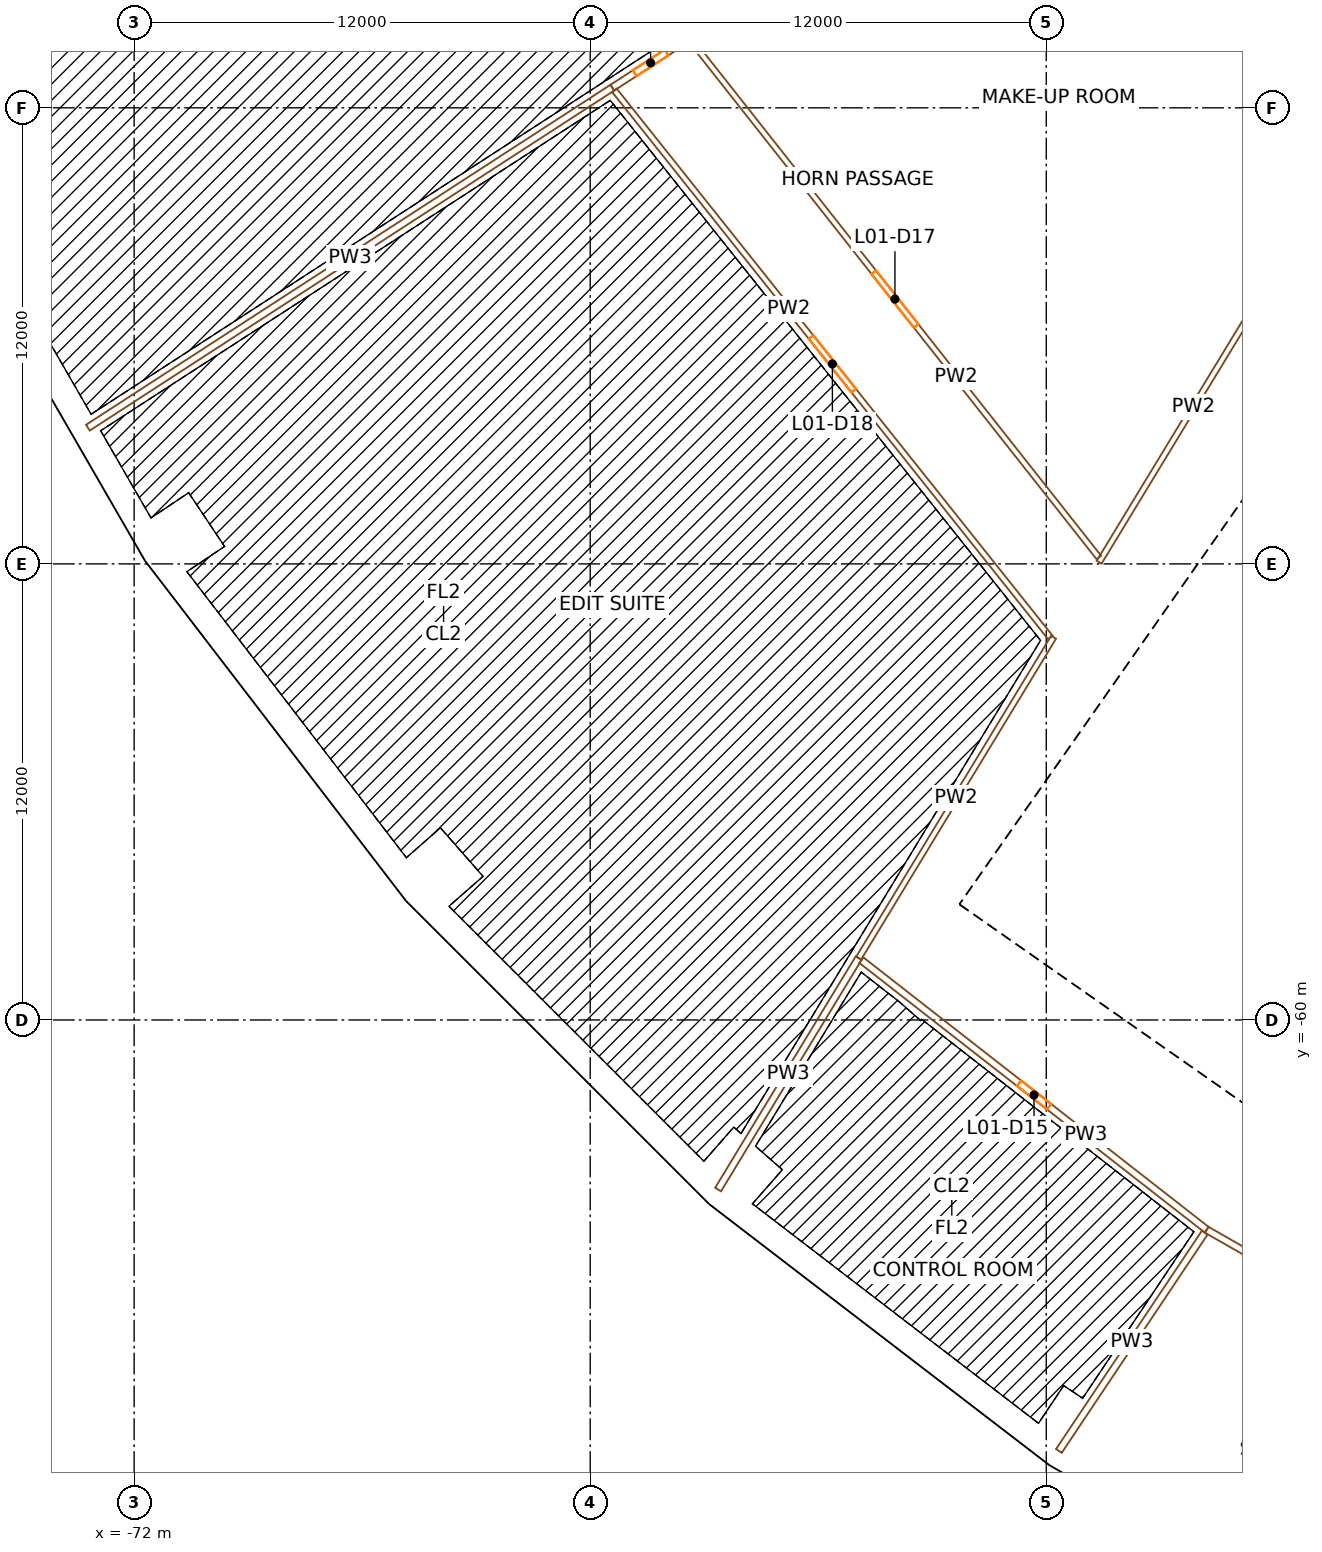
"""IFC4 building model, lengths in metres.
Left out: names, types, materials, properties, quantities, classifications, styles, units other than length and angle.
Written with IfcOpenShell. Run it as: python <this file> out.ifc"""

import sys

from ifc_helpers import new_model, si_unit, direction, frame, frame_2d, origin, origin_2d, place, context, subcontext, project, spatial, rectangle, extrude, element, fill, save


model = new_model("IFC4")
c1 = context("Model", 3, precision=1e-05, world=origin(), true_north=direction((0.0, 1.0)))
c2 = subcontext(c1, "Body", "Model", "MODEL_VIEW")
j1 = project(units=[si_unit("LENGTHUNIT", "METRE"), si_unit("PLANEANGLEUNIT", "RADIAN")], contexts=[c1])
p1 = place(None, origin())
s1 = spatial("IfcSite", under=j1, at=p1, CompositionType="ELEMENT")
p2 = place(p1, origin())
s2 = spatial("IfcBuilding", under=s1, at=p2, CompositionType="ELEMENT")
p3 = place(p2, frame((0.0, 0.0, 9.0)))
s3 = spatial("IfcBuildingStorey", under=s2, at=p3, CompositionType="ELEMENT", Elevation=9.0)
for number, where, z_axis, x_axis in (
    (1, (-69.732, -34.388, 0.0), (0.0, 0.0, 1.0), (0.442, -0.897, 0.0)),
    (2, (-64.647, -43.196, 0.0), (0.0, 0.0, 1.0), (0.556, -0.831, 0.0)),
):
    element("IfcColumn", number, at=place(p3, frame(where, z_axis=z_axis, x_axis=x_axis)), inside=s3, PredefinedType="COLUMN", context=c2, shape_type="SweptSolid", body=[
        extrude(rectangle(XDim=1.4, YDim=1.8, at=origin_2d()), origin(), (0.0, 0.0, 1.0), 9.0),
    ])
p4 = place(p3, frame((-70.883, -47.362, 0.0), z_axis=(0.0, 0.0, 1.0), x_axis=(0.55557023302, -0.831469612303, 0.0)))
e3 = element("IfcColumn", 3, at=p4, inside=s3, PredefinedType="COLUMN", context=c2, shape_type="SweptSolid", body=[
    extrude(rectangle(XDim=1.1, YDim=1.3, at=origin_2d()), origin(), (0.0, 0.0, 1.0), 9.0),
])
for number, where, z_axis, x_axis in (
    (4, (-43.795, -38.407, 0.0), (0.0, 0.0, 1.0), (0.659, -0.752, 0.0)),
    (5, (-58.456, -51.264, 0.0), (0.0, 0.0, 1.0), (0.659, -0.752, 0.0)),
):
    element("IfcColumn", number, at=place(p3, frame(where, z_axis=z_axis, x_axis=x_axis)), inside=s3, PredefinedType="COLUMN", context=c2, shape_type="SweptSolid", body=[
        extrude(rectangle(XDim=1.4, YDim=1.8, at=origin_2d()), origin(), (0.0, 0.0, 1.0), 9.0),
    ])
p5 = place(p3, frame((-64.094, -56.209, 0.0), z_axis=(0.0, 0.0, 1.0), x_axis=(0.6593458151, -0.751839807479, 0.0)))
e6 = element("IfcColumn", 6, at=p5, inside=s3, PredefinedType="COLUMN", context=c2, shape_type="SweptSolid", body=[
    extrude(rectangle(XDim=1.1, YDim=1.3, at=origin_2d()), origin(), (0.0, 0.0, 1.0), 9.0),
])
p6 = place(p3, frame((-51.264, -58.456, 0.0), z_axis=(0.0, 0.0, 1.0), x_axis=(0.751839807479, -0.6593458151, 0.0)))
e7 = element("IfcColumn", 7, at=p6, inside=s3, PredefinedType="COLUMN", context=c2, shape_type="SweptSolid", body=[
    extrude(rectangle(XDim=1.4, YDim=1.8, at=origin_2d()), origin(), (0.0, 0.0, 1.0), 9.0),
])
p7 = place(p3, frame((-56.209, -64.094, 0.0), z_axis=(0.0, 0.0, 1.0), x_axis=(0.751839807479, -0.6593458151, 0.0)))
e8 = element("IfcColumn", 8, at=p7, inside=s3, PredefinedType="COLUMN", context=c2, shape_type="SweptSolid", body=[
    extrude(rectangle(XDim=1.1, YDim=1.3, at=origin_2d()), origin(), (0.0, 0.0, 1.0), 9.0),
])
p8 = place(p3, frame((-43.196, -64.647, 0.0), z_axis=(0.0, 0.0, 1.0), x_axis=(0.831469612303, -0.55557023302, 0.0)))
e9 = element("IfcColumn", 9, at=p8, inside=s3, PredefinedType="COLUMN", context=c2, shape_type="SweptSolid", body=[
    extrude(rectangle(XDim=1.4, YDim=1.8, at=origin_2d()), origin(), (0.0, 0.0, 1.0), 9.0),
])
p9 = place(p3, frame((-47.362, -70.883, 0.0), z_axis=(0.0, 0.0, 1.0), x_axis=(0.831469612303, -0.55557023302, 0.0)))
e10 = element("IfcColumn", 10, at=p9, inside=s3, PredefinedType="COLUMN", context=c2, shape_type="SweptSolid", body=[
    extrude(rectangle(XDim=1.1, YDim=1.3, at=origin_2d()), origin(), (0.0, 0.0, 1.0), 9.0),
])
p10 = place(p3, frame((-49.779, -57.191, 0.0), z_axis=(0.0, 0.0, 1.0), x_axis=(0.573577477574, 0.819151315216, 0.0)))
e11 = element("IfcWall", 11, at=p10, inside=s3, PredefinedType="SHEAR", context=c2, shape_type="SweptSolid", body=[
    extrude(rectangle(XDim=14.8, YDim=0.9, at=frame_2d((7.4, 0.0))), origin(), (0.0, 0.0, 1.0), 8.6),
])
p11 = place(p10, frame((6.7, 0.0, 0.0)))
e12 = element("IfcOpeningElement", 12, at=p11, cuts=e11, PredefinedType="OPENING", context=c2, shape_type="SweptSolid", body=[
    extrude(rectangle(XDim=1.4, YDim=2.1, at=frame_2d((0.7, 1.05))), frame((0.0, 0.46, 0.0), z_axis=(0.0, -1.0, 0.0), x_axis=(1.0, 0.0, 0.0)), (0.0, 0.0, 1.0), 0.92),
])
p12 = place(p3, frame((-36.827, -65.71, 0.0), z_axis=(0.0, 0.0, 1.0), x_axis=(-0.819153391756, 0.573574511963, 0.0)))
e13 = element("IfcWall", 13, at=p12, inside=s3, PredefinedType="SHEAR", context=c2, shape_type="SweptSolid", body=[
    extrude(rectangle(XDim=15.045, YDim=0.9, at=frame_2d((7.523, 0.0))), origin(), (0.0, 0.0, 1.0), 8.6),
])
p13 = place(p12, frame((0.8, 0.0, 0.0)))
e14 = element("IfcOpeningElement", 14, at=p13, cuts=e13, PredefinedType="OPENING", context=c2, shape_type="SweptSolid", body=[
    extrude(rectangle(XDim=1.0, YDim=2.1, at=frame_2d((0.5, 1.05))), frame((0.0, 0.46, 0.0), z_axis=(0.0, -1.0, 0.0), x_axis=(1.0, 0.0, 0.0)), (0.0, 0.0, 1.0), 0.92),
])
p14 = place(p12, frame((3.475, 0.0, 0.0)))
e15 = element("IfcOpeningElement", 15, at=p14, cuts=e13, PredefinedType="OPENING", context=c2, shape_type="SweptSolid", body=[
    extrude(rectangle(XDim=1.0, YDim=2.1, at=frame_2d((0.5, 1.05))), frame((0.0, 0.46, 0.0), z_axis=(0.0, -1.0, 0.0), x_axis=(1.0, 0.0, 0.0)), (0.0, 0.0, 1.0), 0.92),
])
p15 = place(p12, frame((6.175, 0.0, 0.0)))
e16 = element("IfcOpeningElement", 16, at=p15, cuts=e13, PredefinedType="OPENING", context=c2, shape_type="SweptSolid", body=[
    extrude(rectangle(XDim=1.0, YDim=2.1, at=frame_2d((0.5, 1.05))), frame((0.0, 0.46, 0.0), z_axis=(0.0, -1.0, 0.0), x_axis=(1.0, 0.0, 0.0)), (0.0, 0.0, 1.0), 0.92),
])
p16 = place(p12, frame((13.495, 0.0, 0.0)))
e17 = element("IfcOpeningElement", 17, at=p16, cuts=e13, PredefinedType="OPENING", context=c2, shape_type="SweptSolid", body=[
    extrude(rectangle(XDim=1.1, YDim=2.1, at=frame_2d((0.55, 1.05))), frame((0.0, 0.46, 0.0), z_axis=(0.0, -1.0, 0.0), x_axis=(1.0, 0.0, 0.0)), (0.0, 0.0, 1.0), 0.92),
])
p17 = place(p3, frame((-43.204, -60.696, 0.0), z_axis=(0.0, 0.0, 1.0), x_axis=(0.573571992966, 0.819155155563, 0.0)))
e18 = element("IfcWall", 18, at=p17, inside=s3, PredefinedType="SOLIDWALL", context=c2, shape_type="SweptSolid", body=[
    extrude(rectangle(XDim=13.0, YDim=0.3, at=frame_2d((6.5, 0.0))), origin(), (0.0, 0.0, 1.0), 8.6),
])
p18 = place(p3, frame((-37.936, -52.91, 0.0), z_axis=(0.0, 0.0, 1.0), x_axis=(-0.819147518138, 0.57358290031, 0.0)))
e19 = element("IfcWall", 19, at=p18, inside=s3, PredefinedType="SOLIDWALL", context=c2, shape_type="SweptSolid", body=[
    extrude(rectangle(XDim=6.795, YDim=0.3, at=frame_2d((3.398, 0.0))), origin(), (0.0, 0.0, 1.0), 8.6),
])
p19 = place(p18, frame((5.32, 0.0, 0.0)))
e20 = element("IfcOpeningElement", 20, at=p19, cuts=e19, PredefinedType="OPENING", context=c2, shape_type="SweptSolid", body=[
    extrude(rectangle(XDim=1.1, YDim=2.1, at=frame_2d((0.55, 1.05))), frame((0.0, 0.16, 0.0), z_axis=(0.0, -1.0, 0.0), x_axis=(1.0, 0.0, 0.0)), (0.0, 0.0, 1.0), 0.32),
])
p20 = place(p3, frame((-41.262, -57.661, 0.0), z_axis=(0.0, 0.0, 1.0), x_axis=(-0.819164398642, 0.573558792102, 0.0)))
e21 = element("IfcWall", 21, at=p20, inside=s3, PredefinedType="SOLIDWALL", context=c2, shape_type="SweptSolid", body=[
    extrude(rectangle(XDim=6.795, YDim=0.3, at=frame_2d((3.397, 0.0))), origin(), (0.0, 0.0, 1.0), 8.6),
])
p21 = place(p20, frame((5.32, 0.0, 0.0)))
e22 = element("IfcOpeningElement", 22, at=p21, cuts=e21, PredefinedType="OPENING", context=c2, shape_type="SweptSolid", body=[
    extrude(rectangle(XDim=1.1, YDim=2.1, at=frame_2d((0.55, 1.05))), frame((0.0, 0.16, 0.0), z_axis=(0.0, -1.0, 0.0), x_axis=(1.0, 0.0, 0.0)), (0.0, 0.0, 1.0), 0.32),
])
p22 = place(p3, frame((-43.757, -55.731, 0.0), z_axis=(0.0, 0.0, 1.0), x_axis=(0.573536818435, 0.819179783625, 0.0)))
e23 = element("IfcWall", 23, at=p22, inside=s3, PredefinedType="SOLIDWALL", context=c2, shape_type="SweptSolid", body=[
    extrude(rectangle(XDim=5.5, YDim=0.3, at=frame_2d((2.75, 0.0))), origin(), (0.0, 0.0, 1.0), 8.6),
])
p23 = place(p22, frame((0.7, 0.0, 0.0)))
e24 = element("IfcOpeningElement", 24, at=p23, cuts=e23, PredefinedType="OPENING", context=c2, shape_type="SweptSolid", body=[
    extrude(rectangle(XDim=1.1, YDim=2.1, at=frame_2d((0.55, 1.05))), frame((0.0, 0.16, 0.0), z_axis=(0.0, -1.0, 0.0), x_axis=(1.0, 0.0, 0.0)), (0.0, 0.0, 1.0), 0.32),
])
p24 = place(p22, frame((3.7, 0.0, 0.0)))
e25 = element("IfcOpeningElement", 25, at=p24, cuts=e23, PredefinedType="OPENING", context=c2, shape_type="SweptSolid", body=[
    extrude(rectangle(XDim=1.1, YDim=2.1, at=frame_2d((0.55, 1.05))), frame((0.0, 0.16, 0.0), z_axis=(0.0, -1.0, 0.0), x_axis=(1.0, 0.0, 0.0)), (0.0, 0.0, 1.0), 0.32),
])
p25 = place(p3, frame((-47.065, -56.192, 0.0), z_axis=(0.0, 0.0, 1.0), x_axis=(0.573822822947, 0.818979467304, 0.0)))
e26 = element("IfcWall", 26, at=p25, inside=s3, PredefinedType="SOLIDWALL", context=c2, shape_type="SweptSolid", body=[
    extrude(rectangle(XDim=0.5, YDim=0.3, at=frame_2d((0.25, 0.0))), origin(), (0.0, 0.0, 1.0), 4.3),
])
p26 = place(p3, frame((-77.168, -38.022, 0.0), z_axis=(0.0, 0.0, 1.0), x_axis=(0.500001430823, -0.866024577697, 0.0)))
e27 = element("IfcWall", 27, at=p26, inside=s3, PredefinedType="SOLIDWALL", context=c2, shape_type="SweptSolid", body=[
    extrude(rectangle(XDim=11.312, YDim=0.45, at=frame_2d((5.656, 0.0))), origin(), (0.0, 0.0, 1.0), 7.7),
])
p27 = place(p3, frame((-71.491, -47.839, 0.0), z_axis=(0.0, 0.0, 1.0), x_axis=(0.608758773695, -0.793355377778, 0.0)))
e28 = element("IfcWall", 28, at=p27, inside=s3, PredefinedType="SOLIDWALL", context=c2, shape_type="SweptSolid", body=[
    extrude(rectangle(XDim=11.135, YDim=0.45, at=frame_2d((5.567, 0.0))), origin(), (0.0, 0.0, 1.0), 7.7),
])
p28 = place(p3, frame((-64.698, -56.699, 0.0), z_axis=(0.0, 0.0, 1.0), x_axis=(0.707106781187, -0.707106781187, 0.0)))
e29 = element("IfcWall", 29, at=p28, inside=s3, PredefinedType="SOLIDWALL", context=c2, shape_type="SweptSolid", body=[
    extrude(rectangle(XDim=11.312, YDim=0.45, at=frame_2d((5.656, 0.0))), origin(), (0.0, 0.0, 1.0), 7.7),
])
p29 = place(p3, frame((-56.673, -64.713, 0.0), z_axis=(0.0, 0.0, 1.0), x_axis=(0.793355377778, -0.608758773695, 0.0)))
e30 = element("IfcWall", 30, at=p29, inside=s3, PredefinedType="SOLIDWALL", context=c2, shape_type="SweptSolid", body=[
    extrude(rectangle(XDim=11.135, YDim=0.45, at=frame_2d((5.567, 0.0))), origin(), (0.0, 0.0, 1.0), 7.7),
])
p30 = place(p3, frame((-47.819, -71.512, 0.0), z_axis=(0.0, 0.0, 1.0), x_axis=(0.866024577697, -0.500001430823, 0.0)))
e31 = element("IfcWall", 31, at=p30, inside=s3, PredefinedType="SOLIDWALL", context=c2, shape_type="SweptSolid", body=[
    extrude(rectangle(XDim=11.312, YDim=0.45, at=frame_2d((5.656, 0.0))), origin(), (0.0, 0.0, 1.0), 7.7),
])
p31 = place(p3, frame((-73.217, -44.416, 0.0), z_axis=(0.0, 0.0, 1.0), x_axis=(0.839098650594, 0.543979277703, 0.0)))
e32 = element("IfcWall", 32, at=p31, inside=s3, PredefinedType="PARTITIONING", context=c2, shape_type="SweptSolid", body=[
    extrude(rectangle(XDim=16.445, YDim=0.18, at=frame_2d((8.223, 0.0))), origin(), (0.0, 0.0, 1.0), 7.6),
])
p32 = place(p3, frame((-59.418, -35.47, 0.0), z_axis=(0.0, 0.0, 1.0), x_axis=(0.839081673018, 0.544005465051, 0.0)))
e33 = element("IfcWall", 33, at=p32, inside=s3, PredefinedType="PARTITIONING", context=c2, shape_type="SweptSolid", body=[
    extrude(rectangle(XDim=2.402, YDim=0.18, at=frame_2d((1.201, 0.0))), origin(), (0.0, 0.0, 1.0), 7.6),
])
p33 = place(p32, frame((0.701, 0.0, 0.0)))
e34 = element("IfcOpeningElement", 34, at=p33, cuts=e33, PredefinedType="OPENING", context=c2, shape_type="SweptSolid", body=[
    extrude(rectangle(XDim=1.0, YDim=2.1, at=frame_2d((0.5, 1.05))), frame((0.0, 0.1, 0.0), z_axis=(0.0, -1.0, 0.0), x_axis=(1.0, 0.0, 0.0)), (0.0, 0.0, 1.0), 0.2),
])
p34 = place(p3, frame((-52.936, -58.372, 0.0), z_axis=(0.0, 0.0, 1.0), x_axis=(-0.519148894699, -0.854683815883, 0.0)))
e35 = element("IfcWall", 35, at=p34, inside=s3, PredefinedType="PARTITIONING", context=c2, shape_type="SweptSolid", body=[
    extrude(rectangle(XDim=7.125, YDim=0.18, at=frame_2d((3.563, 0.0))), origin(), (0.0, 0.0, 1.0), 7.6),
])
p35 = place(p3, frame((-43.779, -65.52, 0.0), z_axis=(0.0, 0.0, 1.0), x_axis=(-0.788252635542, 0.615351755146, 0.0)))
e36 = element("IfcWall", 36, at=p35, inside=s3, PredefinedType="PARTITIONING", context=c2, shape_type="SweptSolid", body=[
    extrude(rectangle(XDim=11.526, YDim=0.18, at=frame_2d((5.763, 0.0))), origin(), (0.0, 0.0, 1.0), 7.6),
])
p36 = place(p35, frame((5.263, 0.0, 0.0)))
e37 = element("IfcOpeningElement", 37, at=p36, cuts=e36, PredefinedType="OPENING", context=c2, shape_type="SweptSolid", body=[
    extrude(rectangle(XDim=1.0, YDim=2.1, at=frame_2d((0.5, 1.05))), frame((0.0, 0.1, 0.0), z_axis=(0.0, -1.0, 0.0), x_axis=(1.0, 0.0, 0.0)), (0.0, 0.0, 1.0), 0.2),
])
p37 = place(p3, frame((-47.668, -71.34, 0.0), z_axis=(0.0, 0.0, 1.0), x_axis=(0.555588604147, 0.831457336814, 0.0)))
e38 = element("IfcWall", 38, at=p37, inside=s3, PredefinedType="PARTITIONING", context=c2, shape_type="SweptSolid", body=[
    extrude(rectangle(XDim=6.91, YDim=0.18, at=frame_2d((3.455, 0.0))), origin(), (0.0, 0.0, 1.0), 7.6),
])
p38 = place(p3, frame((-47.893, -49.935, 0.0), z_axis=(0.0, 0.0, 1.0), x_axis=(-0.623145641882, 0.782105817011, 0.0)))
e39 = element("IfcWall", 39, at=p38, inside=s3, PredefinedType="PARTITIONING", context=c2, shape_type="SweptSolid", body=[
    extrude(rectangle(XDim=18.404, YDim=0.15, at=frame_2d((9.202, 0.0))), origin(), (0.0, 0.0, 1.0), 7.6),
])
p39 = place(p38, frame((8.302, 0.0, 0.0)))
e40 = element("IfcOpeningElement", 40, at=p39, cuts=e39, PredefinedType="OPENING", context=c2, shape_type="SweptSolid", body=[
    extrude(rectangle(XDim=1.8, YDim=2.1, at=frame_2d((0.9, 1.05))), frame((0.0, 0.085, 0.0), z_axis=(0.0, -1.0, 0.0), x_axis=(1.0, 0.0, 0.0)), (0.0, 0.0, 1.0), 0.17),
])
p40 = place(p3, frame((-47.808, -49.929, 0.0), z_axis=(0.0, 0.0, 1.0), x_axis=(-0.519169679695, -0.854671190392, 0.0)))
e41 = element("IfcWall", 41, at=p40, inside=s3, PredefinedType="PARTITIONING", context=c2, shape_type="SweptSolid", body=[
    extrude(rectangle(XDim=9.878, YDim=0.15, at=frame_2d((4.939, 0.0))), origin(), (0.0, 0.0, 1.0), 7.6),
])
p41 = place(p3, frame((-57.347, -34.235, 0.0), z_axis=(0.0, 0.0, 1.0), x_axis=(0.619516324984, -0.784983772494, 0.0)))
e42 = element("IfcWall", 42, at=p41, inside=s3, PredefinedType="PARTITIONING", context=c2, shape_type="SweptSolid", body=[
    extrude(rectangle(XDim=17.322, YDim=0.15, at=frame_2d((8.661, 0.0))), origin(), (0.0, 0.0, 1.0), 7.6),
])
p42 = place(p41, frame((7.761, 0.0, 0.0)))
e43 = element("IfcOpeningElement", 43, at=p42, cuts=e42, PredefinedType="OPENING", context=c2, shape_type="SweptSolid", body=[
    extrude(rectangle(XDim=1.8, YDim=2.1, at=frame_2d((0.9, 1.05))), frame((0.0, 0.085, 0.0), z_axis=(0.0, -1.0, 0.0), x_axis=(1.0, 0.0, 0.0)), (0.0, 0.0, 1.0), 0.17),
])
p43 = place(p3, frame((-34.338, -70.918, 0.0), z_axis=(0.0, 0.0, 1.0), x_axis=(-0.868109106225, 0.496373427663, 0.0)))
e44 = element("IfcWall", 44, at=p43, inside=s3, PredefinedType="PARTITIONING", context=c2, shape_type="SweptSolid", body=[
    extrude(rectangle(XDim=10.875, YDim=0.18, at=frame_2d((5.438, 0.0))), origin(), (0.0, 0.0, 1.0), 7.6),
])
p44 = place(p43, frame((4.938, 0.0, 0.0)))
e45 = element("IfcOpeningElement", 45, at=p44, cuts=e44, PredefinedType="OPENING", context=c2, shape_type="SweptSolid", body=[
    extrude(rectangle(XDim=1.0, YDim=2.1, at=frame_2d((0.5, 1.05))), frame((0.0, 0.1, 0.0), z_axis=(0.0, -1.0, 0.0), x_axis=(1.0, 0.0, 0.0)), (0.0, 0.0, 1.0), 0.2),
])
p45 = place(p3, frame((-41.648, -39.789, 0.0), z_axis=(0.0, 0.0, 1.0), x_axis=(-0.519144162426, -0.854686690325, 0.0)))
e46 = element("IfcWall", 46, at=p45, inside=s3, PredefinedType="PARTITIONING", context=c2, shape_type="SweptSolid", body=[
    extrude(rectangle(XDim=9.554, YDim=0.15, at=frame_2d((4.777, 0.0))), origin(), (0.0, 0.0, 1.0), 7.6),
])
p46 = place(p23, origin())
e47 = element("IfcDoor", 47, at=p46, inside=s3, OperationType="DOUBLE_DOOR_SLIDING", PredefinedType="DOOR", context=c2, shape_type="SweptSolid", body=[
    extrude(rectangle(XDim=1.1, YDim=2.1, at=frame_2d((0.55, 1.05))), frame((0.0, 0.025, 0.0), z_axis=(0.0, -1.0, 0.0), x_axis=(1.0, 0.0, 0.0)), (0.0, 0.0, 1.0), 0.05),
])
fill(e24, e47)
p47 = place(p11, origin())
e48 = element("IfcDoor", 48, at=p47, inside=s3, OperationType="DOUBLE_DOOR_SINGLE_SWING", PredefinedType="DOOR", context=c2, shape_type="SweptSolid", body=[
    extrude(rectangle(XDim=1.4, YDim=2.1, at=frame_2d((0.7, 1.05))), frame((0.0, 0.025, 0.0), z_axis=(0.0, -1.0, 0.0), x_axis=(1.0, 0.0, 0.0)), (0.0, 0.0, 1.0), 0.05),
])
fill(e12, e48)
p48 = place(p19, origin())
e49 = element("IfcDoor", 49, at=p48, inside=s3, OperationType="SINGLE_SWING_LEFT", PredefinedType="DOOR", context=c2, shape_type="SweptSolid", body=[
    extrude(rectangle(XDim=1.1, YDim=2.1, at=frame_2d((0.55, 1.05))), frame((0.0, 0.025, 0.0), z_axis=(0.0, -1.0, 0.0), x_axis=(1.0, 0.0, 0.0)), (0.0, 0.0, 1.0), 0.05),
])
fill(e20, e49)
p49 = place(p16, origin())
e50 = element("IfcDoor", 50, at=p49, inside=s3, OperationType="SINGLE_SWING_LEFT", PredefinedType="DOOR", context=c2, shape_type="SweptSolid", body=[
    extrude(rectangle(XDim=1.1, YDim=2.1, at=frame_2d((0.55, 1.05))), frame((0.0, 0.025, 0.0), z_axis=(0.0, -1.0, 0.0), x_axis=(1.0, 0.0, 0.0)), (0.0, 0.0, 1.0), 0.05),
])
fill(e17, e50)
p50 = place(p21, origin())
e51 = element("IfcDoor", 51, at=p50, inside=s3, OperationType="SINGLE_SWING_LEFT", PredefinedType="DOOR", context=c2, shape_type="SweptSolid", body=[
    extrude(rectangle(XDim=1.1, YDim=2.1, at=frame_2d((0.55, 1.05))), frame((0.0, 0.025, 0.0), z_axis=(0.0, -1.0, 0.0), x_axis=(1.0, 0.0, 0.0)), (0.0, 0.0, 1.0), 0.05),
])
fill(e22, e51)
p51 = place(p36, origin())
e52 = element("IfcDoor", 52, at=p51, inside=s3, OperationType="SINGLE_SWING_RIGHT", PredefinedType="DOOR", context=c2, shape_type="SweptSolid", body=[
    extrude(rectangle(XDim=1.0, YDim=2.1, at=frame_2d((0.5, 1.05))), frame((0.0, 0.025, 0.0), z_axis=(0.0, -1.0, 0.0), x_axis=(1.0, 0.0, 0.0)), (0.0, 0.0, 1.0), 0.05),
])
fill(e37, e52)
p52 = place(p42, origin())
e53 = element("IfcDoor", 53, at=p52, inside=s3, OperationType="DOUBLE_DOOR_SINGLE_SWING", PredefinedType="DOOR", context=c2, shape_type="SweptSolid", body=[
    extrude(rectangle(XDim=1.8, YDim=2.1, at=frame_2d((0.9, 1.05))), frame((0.0, 0.025, 0.0), z_axis=(0.0, -1.0, 0.0), x_axis=(1.0, 0.0, 0.0)), (0.0, 0.0, 1.0), 0.05),
])
fill(e43, e53)
p53 = place(p39, origin())
e54 = element("IfcDoor", 54, at=p53, inside=s3, OperationType="DOUBLE_DOOR_SINGLE_SWING", PredefinedType="DOOR", context=c2, shape_type="SweptSolid", body=[
    extrude(rectangle(XDim=1.8, YDim=2.1, at=frame_2d((0.9, 1.05))), frame((0.0, 0.025, 0.0), z_axis=(0.0, -1.0, 0.0), x_axis=(1.0, 0.0, 0.0)), (0.0, 0.0, 1.0), 0.05),
])
fill(e40, e54)
p54 = place(p33, origin())
e55 = element("IfcDoor", 55, at=p54, inside=s3, OperationType="SINGLE_SWING_RIGHT", PredefinedType="DOOR", context=c2, shape_type="SweptSolid", body=[
    extrude(rectangle(XDim=1.0, YDim=2.1, at=frame_2d((0.5, 1.05))), frame((0.0, 0.025, 0.0), z_axis=(0.0, -1.0, 0.0), x_axis=(1.0, 0.0, 0.0)), (0.0, 0.0, 1.0), 0.05),
])
fill(e34, e55)
save(model, sys.argv[1])
